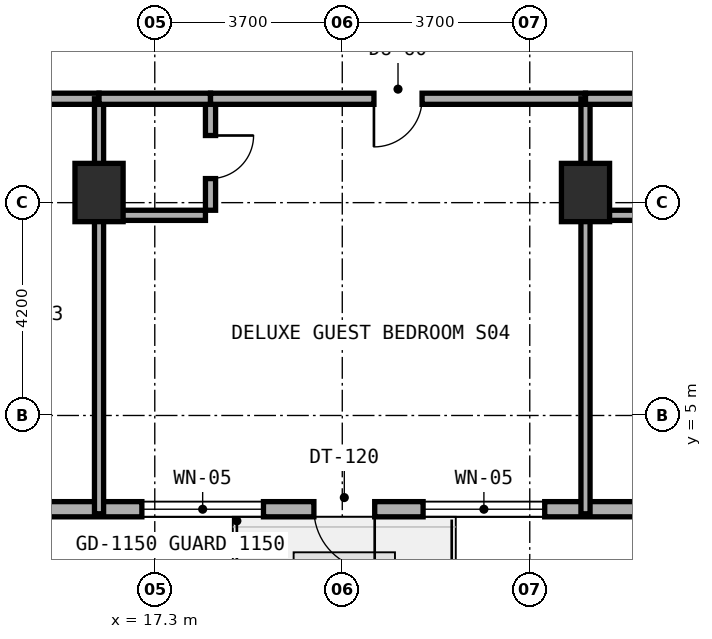
"""IFC4 building model, lengths in metres.
Left out: names, types, materials, properties, quantities, classifications, styles, units other than length and angle.
Written with IfcOpenShell. Run it as: python <this file> out.ifc"""

import sys

from ifc_helpers import new_model, si_unit, direction, frame, frame_2d, origin, origin_2d, place, context, subcontext, project, spatial, rectangle, extrude, element, fill, save


model = new_model("IFC4")
c1 = context("Model", 3, precision=1e-05, world=origin(), true_north=direction((0.0, 1.0)))
c2 = subcontext(c1, "Body", "Model", "MODEL_VIEW")
j1 = project(units=[si_unit("LENGTHUNIT", "METRE"), si_unit("PLANEANGLEUNIT", "RADIAN")], contexts=[c1])
p1 = place(None, origin())
s1 = spatial("IfcSite", under=j1, at=p1, CompositionType="ELEMENT")
p2 = place(p1, origin())
s2 = spatial("IfcBuilding", under=s1, at=p2, CompositionType="ELEMENT")
p3 = place(p2, frame((0.0, 0.0, 59.0)))
s3 = spatial("IfcBuildingStorey", under=s2, at=p3, CompositionType="ELEMENT", Elevation=59.0)
for number, where, z_axis, x_axis in (
    (1, (16.2, 9.4, 0.0), (0.0, 0.0, 1.0), (1.0, 0.0, 0.0)),
    (2, (25.8, 9.4, 0.0), (0.0, 0.0, 1.0), (1.0, 0.0, 0.0)),
):
    element("IfcColumn", number, at=place(p3, frame(where, z_axis=z_axis, x_axis=x_axis)), inside=s3, PredefinedType="COLUMN", context=c2, shape_type="SweptSolid", body=[
        extrude(rectangle(XDim=0.95, YDim=1.15, at=origin_2d()), origin(), (0.0, 0.0, 1.0), 3.5),
    ])
p4 = place(p3, frame((14.727, 3.15, 0.0), z_axis=(0.0, 0.0, 1.0), x_axis=(1.0, 0.0, 0.0)))
e3 = element("IfcWall", 3, at=p4, inside=s3, PredefinedType="STANDARD", context=c2, shape_type="SweptSolid", body=[
    extrude(rectangle(XDim=12.591, YDim=0.3, at=frame_2d((6.295, 0.0))), origin(), (0.0, 0.0, 1.0), 3.22),
])
p5 = place(p4, frame((5.713, 0.0, 0.0)))
e4 = element("IfcOpeningElement", 4, at=p5, cuts=e3, PredefinedType="OPENING", context=c2, shape_type="SweptSolid", body=[
    extrude(rectangle(XDim=1.2, YDim=2.15, at=frame_2d((0.6, 1.075))), frame((0.0, 0.16, 0.0), z_axis=(0.0, -1.0, 0.0), x_axis=(1.0, 0.0, 0.0)), (0.0, 0.0, 1.0), 0.32),
])
p6 = place(p4, frame((2.318, 0.0, 0.8)))
e5 = element("IfcOpeningElement", 5, at=p6, cuts=e3, PredefinedType="OPENING", context=c2, shape_type="SweptSolid", body=[
    extrude(rectangle(XDim=2.4, YDim=1.6, at=frame_2d((1.2, 0.8))), frame((0.0, 0.16, 0.0), z_axis=(0.0, -1.0, 0.0), x_axis=(1.0, 0.0, 0.0)), (0.0, 0.0, 1.0), 0.32),
])
p7 = place(p4, frame((7.868, 0.0, 0.8)))
e6 = element("IfcOpeningElement", 6, at=p7, cuts=e3, PredefinedType="OPENING", context=c2, shape_type="SweptSolid", body=[
    extrude(rectangle(XDim=2.4, YDim=1.6, at=frame_2d((1.2, 0.8))), frame((0.0, 0.16, 0.0), z_axis=(0.0, -1.0, 0.0), x_axis=(1.0, 0.0, 0.0)), (0.0, 0.0, 1.0), 0.32),
])
p8 = place(p3, frame((5.55, 11.25, 0.0), z_axis=(0.0, 0.0, 1.0), x_axis=(1.0, 0.0, 0.0)))
e7 = element("IfcWall", 7, at=p8, inside=s3, PredefinedType="SOLIDWALL", context=c2, shape_type="SweptSolid", body=[
    extrude(rectangle(XDim=10.65, YDim=0.22, at=frame_2d((5.325, 0.0))), origin(), (0.0, 0.0, 1.0), 2.495),
])
p9 = place(p8, frame((4.85, 0.0, 0.0)))
e8 = element("IfcOpeningElement", 8, at=p9, cuts=e7, PredefinedType="OPENING", context=c2, shape_type="SweptSolid", body=[
    extrude(rectangle(XDim=0.95, YDim=2.1, at=frame_2d((0.475, 1.05))), frame((0.0, 0.12, 0.0), z_axis=(0.0, -1.0, 0.0), x_axis=(1.0, 0.0, 0.0)), (0.0, 0.0, 1.0), 0.24),
])
p10 = place(p3, frame((16.2, 3.06, 0.0), z_axis=(0.0, 0.0, 1.0), x_axis=(0.0, 1.0, 0.0)))
e9 = element("IfcWall", 9, at=p10, inside=s3, PredefinedType="SOLIDWALL", context=c2, shape_type="SweptSolid", body=[
    extrude(rectangle(XDim=8.19, YDim=0.18, at=frame_2d((4.095, 0.0))), origin(), (0.0, 0.0, 1.0), 2.495),
])
p11 = place(p3, frame((18.4, 9.05, 0.0), z_axis=(0.0, 0.0, 1.0), x_axis=(0.0, 1.0, 0.0)))
e10 = element("IfcWall", 10, at=p11, inside=s3, PredefinedType="PLUMBINGWALL", context=c2, shape_type="SweptSolid", body=[
    extrude(rectangle(XDim=2.1, YDim=0.2, at=frame_2d((1.05, 0.0))), origin(), (0.0, 0.0, 1.0), 2.745),
])
p12 = place(p11, frame((0.625, 0.0, 0.0)))
e11 = element("IfcOpeningElement", 11, at=p12, cuts=e10, PredefinedType="OPENING", context=c2, shape_type="SweptSolid", body=[
    extrude(rectangle(XDim=0.85, YDim=2.1, at=frame_2d((0.425, 1.05))), frame((0.0, 0.11, 0.0), z_axis=(0.0, -1.0, 0.0), x_axis=(1.0, 0.0, 0.0)), (0.0, 0.0, 1.0), 0.22),
])
p13 = place(p3, frame((16.3, 8.95, 0.0), z_axis=(0.0, 0.0, 1.0), x_axis=(1.0, 0.0, 0.0)))
e12 = element("IfcWall", 12, at=p13, inside=s3, PredefinedType="PLUMBINGWALL", context=c2, shape_type="SweptSolid", body=[
    extrude(rectangle(XDim=2.0, YDim=0.2, at=frame_2d((1.0, 0.0))), origin(), (0.0, 0.0, 1.0), 3.22),
])
p14 = place(p3, frame((16.2, 11.25, 0.0), z_axis=(0.0, 0.0, 1.0), x_axis=(1.0, 0.0, 0.0)))
e13 = element("IfcWall", 13, at=p14, inside=s3, PredefinedType="SOLIDWALL", context=c2, shape_type="SweptSolid", body=[
    extrude(rectangle(XDim=2.2, YDim=0.22, at=frame_2d((1.1, 0.0))), origin(), (0.0, 0.0, 1.0), 2.495),
])
p15 = place(p3, frame((18.4, 11.25, 0.0), z_axis=(0.0, 0.0, 1.0), x_axis=(1.0, 0.0, 0.0)))
e14 = element("IfcWall", 14, at=p15, inside=s3, PredefinedType="SOLIDWALL", context=c2, shape_type="SweptSolid", body=[
    extrude(rectangle(XDim=7.4, YDim=0.22, at=frame_2d((3.7, 0.0))), origin(), (0.0, 0.0, 1.0), 2.495),
])
p16 = place(p15, frame((3.225, 0.0, 0.0)))
e15 = element("IfcOpeningElement", 15, at=p16, cuts=e14, PredefinedType="OPENING", context=c2, shape_type="SweptSolid", body=[
    extrude(rectangle(XDim=0.95, YDim=2.1, at=frame_2d((0.475, 1.05))), frame((0.0, 0.12, 0.0), z_axis=(0.0, -1.0, 0.0), x_axis=(1.0, 0.0, 0.0)), (0.0, 0.0, 1.0), 0.24),
])
p17 = place(p3, frame((25.8, 3.06, 0.0), z_axis=(0.0, 0.0, 1.0), x_axis=(0.0, 1.0, 0.0)))
e16 = element("IfcWall", 16, at=p17, inside=s3, PredefinedType="SOLIDWALL", context=c2, shape_type="SweptSolid", body=[
    extrude(rectangle(XDim=8.19, YDim=0.18, at=frame_2d((4.095, 0.0))), origin(), (0.0, 0.0, 1.0), 2.495),
])
p18 = place(p3, frame((25.9, 8.95, 0.0), z_axis=(0.0, 0.0, 1.0), x_axis=(1.0, 0.0, 0.0)))
e17 = element("IfcWall", 17, at=p18, inside=s3, PredefinedType="PLUMBINGWALL", context=c2, shape_type="SweptSolid", body=[
    extrude(rectangle(XDim=2.0, YDim=0.2, at=frame_2d((1.0, 0.0))), origin(), (0.0, 0.0, 1.0), 3.22),
])
p19 = place(p3, frame((25.8, 11.25, 0.0), z_axis=(0.0, 0.0, 1.0), x_axis=(1.0, 0.0, 0.0)))
e18 = element("IfcWall", 18, at=p19, inside=s3, PredefinedType="SOLIDWALL", context=c2, shape_type="SweptSolid", body=[
    extrude(rectangle(XDim=2.2, YDim=0.22, at=frame_2d((1.1, 0.0))), origin(), (0.0, 0.0, 1.0), 2.495),
])
p20 = place(p5, frame((1.2, 0.0, 0.0), z_axis=(0.0, 0.0, 1.0), x_axis=(-1.0, 0.0, 0.0)))
e19 = element("IfcDoor", 19, at=p20, inside=s3, OperationType="SINGLE_SWING_LEFT", PredefinedType="DOOR", context=c2, shape_type="SweptSolid", body=[
    extrude(rectangle(XDim=1.2, YDim=2.15, at=frame_2d((0.6, 1.075))), frame((0.0, 0.025, 0.0), z_axis=(0.0, -1.0, 0.0), x_axis=(1.0, 0.0, 0.0)), (0.0, 0.0, 1.0), 0.05),
])
fill(e4, e19)
p21 = place(p6, origin())
e20 = element("IfcWindow", 20, at=p21, inside=s3, PartitioningType="SINGLE_PANEL", PredefinedType="WINDOW", context=c2, shape_type="SweptSolid", body=[
    extrude(rectangle(XDim=2.4, YDim=1.6, at=frame_2d((1.2, 0.8))), frame((0.0, 0.03, 0.0), z_axis=(0.0, -1.0, 0.0), x_axis=(1.0, 0.0, 0.0)), (0.0, 0.0, 1.0), 0.06),
])
fill(e5, e20)
p22 = place(p7, origin())
e21 = element("IfcWindow", 21, at=p22, inside=s3, PartitioningType="SINGLE_PANEL", PredefinedType="WINDOW", context=c2, shape_type="SweptSolid", body=[
    extrude(rectangle(XDim=2.4, YDim=1.6, at=frame_2d((1.2, 0.8))), frame((0.0, 0.03, 0.0), z_axis=(0.0, -1.0, 0.0), x_axis=(1.0, 0.0, 0.0)), (0.0, 0.0, 1.0), 0.06),
])
fill(e6, e21)
p23 = place(p12, frame((0.85, 0.0, 0.0), z_axis=(0.0, 0.0, 1.0), x_axis=(-1.0, 0.0, 0.0)))
e22 = element("IfcDoor", 22, at=p23, inside=s3, OperationType="SINGLE_SWING_LEFT", PredefinedType="DOOR", context=c2, shape_type="SweptSolid", body=[
    extrude(rectangle(XDim=0.85, YDim=2.1, at=frame_2d((0.425, 1.05))), frame((0.0, 0.025, 0.0), z_axis=(0.0, -1.0, 0.0), x_axis=(1.0, 0.0, 0.0)), (0.0, 0.0, 1.0), 0.05),
])
fill(e11, e22)
p24 = place(p16, frame((0.95, 0.0, 0.0), z_axis=(0.0, 0.0, 1.0), x_axis=(-1.0, 0.0, 0.0)))
e23 = element("IfcDoor", 23, at=p24, inside=s3, OperationType="SINGLE_SWING_RIGHT", PredefinedType="DOOR", context=c2, shape_type="SweptSolid", body=[
    extrude(rectangle(XDim=0.95, YDim=2.1, at=frame_2d((0.475, 1.05))), frame((0.0, 0.025, 0.0), z_axis=(0.0, -1.0, 0.0), x_axis=(1.0, 0.0, 0.0)), (0.0, 0.0, 1.0), 0.05),
])
fill(e15, e23)
save(model, sys.argv[1])
